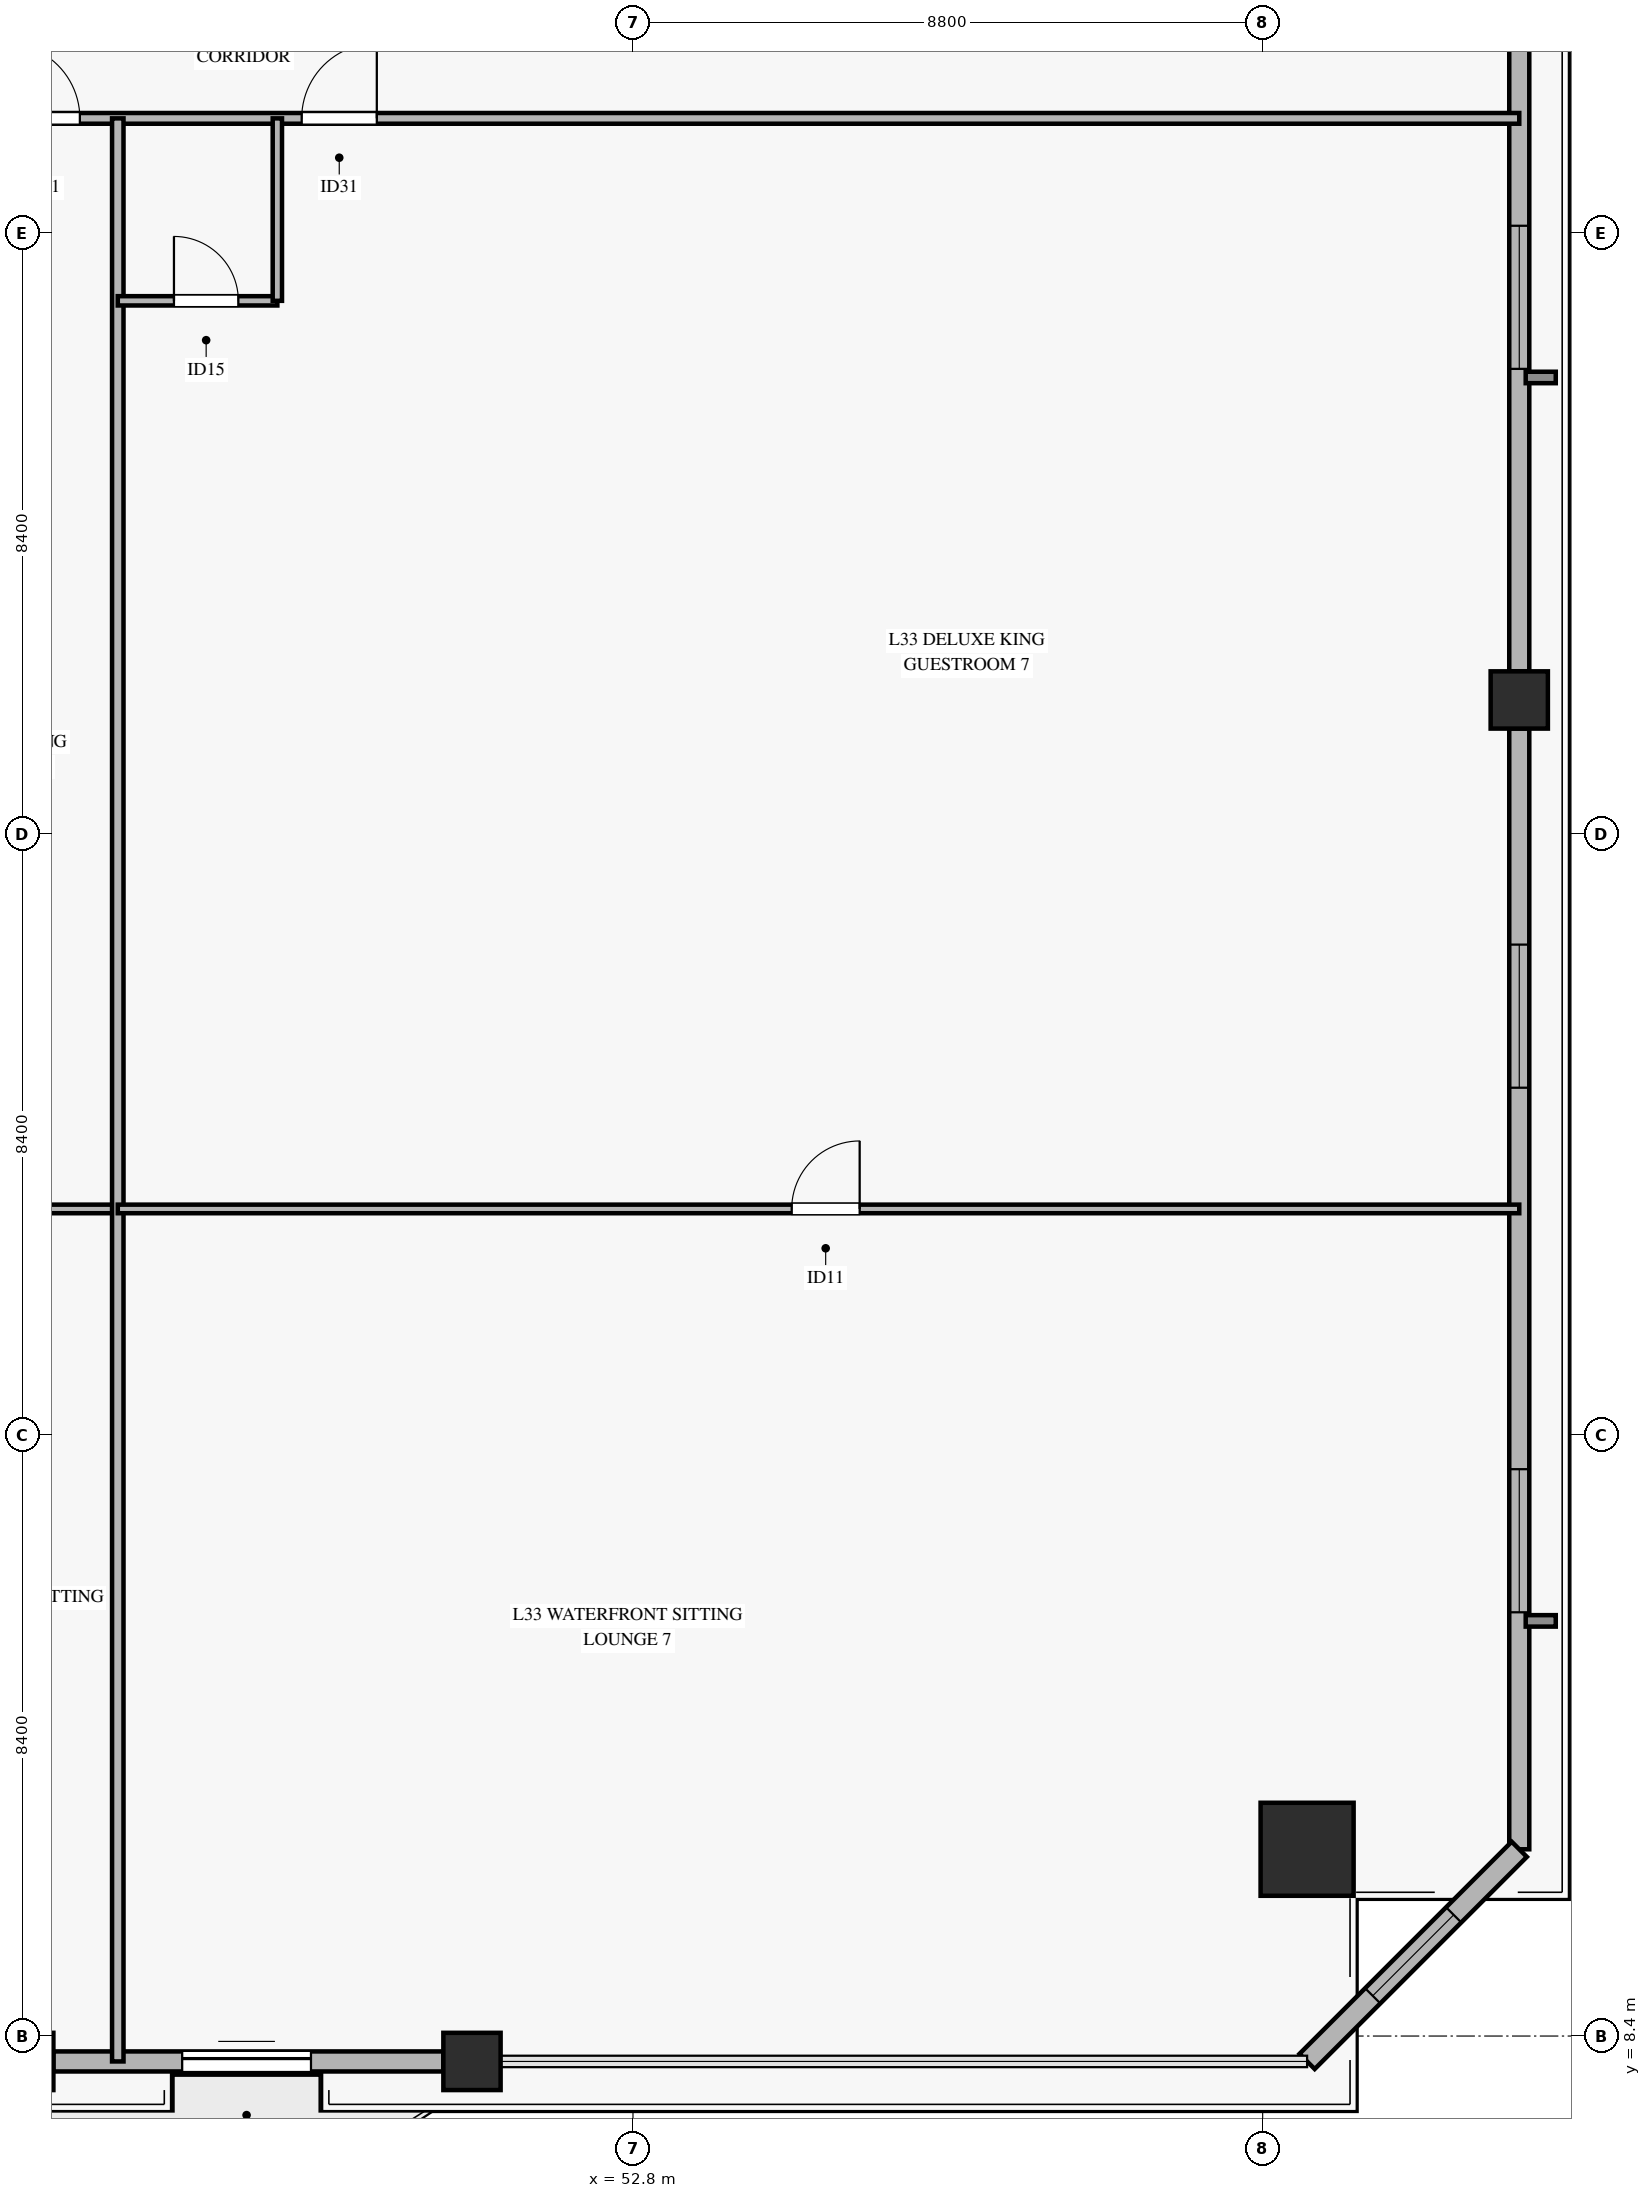
"""IFC4 building model, lengths in metres.
Left out: names, types, materials, properties, quantities, classifications, styles, units other than length and angle.
Written with IfcOpenShell. Run it as: python <this file> out.ifc"""

import sys

from ifc_helpers import new_model, si_unit, direction, frame, frame_2d, origin, origin_2d, place, context, subcontext, project, spatial, rectangle, hollow_rectangle, extrude, source, transform, mapped, element, fill, save


model = new_model("IFC4")
c1 = context("Model", 3, precision=1e-05, world=origin(), true_north=direction((0.0, 1.0)))
c2 = subcontext(c1, "Body", "Model", "MODEL_VIEW")
j1 = project(units=[si_unit("LENGTHUNIT", "METRE"), si_unit("PLANEANGLEUNIT", "RADIAN")], contexts=[c1])
p1 = place(None, origin())
s1 = spatial("IfcSite", under=j1, at=p1, CompositionType="ELEMENT")
p2 = place(p1, origin())
s2 = spatial("IfcBuilding", under=s1, at=p2, CompositionType="ELEMENT")
p3 = place(p2, frame((0.0, 0.0, 137.7)))
s3 = spatial("IfcBuildingStorey", under=s2, at=p3, CompositionType="ELEMENT", Elevation=137.7)
m1 = source(origin(), c2, "Body", "SweptSolid", [
    extrude(hollow_rectangle(XDim=1.3, YDim=1.3, WallThickness=0.06, at=origin_2d()), origin(), (0.0, 0.0, 1.0), 3.27),
])
p4 = place(p3, frame((62.221, 11.01, 0.0), z_axis=(0.0, 0.0, 1.0), x_axis=(1.0, 0.0, 0.0)))
e1 = element("IfcColumn", 1, at=p4, inside=s3, PredefinedType="COLUMN", context=c2, shape_type="MappedRepresentation", body=[
    mapped(m1, transform((0.0, 0.0, 0.0), x_axis=(1.0, 0.0, 0.0), y_axis=(0.0, 1.0, 0.0), z_axis=(0.0, 0.0, 1.0), scale=1.0)),
])
m2 = source(origin(), c2, "Body", "SweptSolid", [
    extrude(hollow_rectangle(XDim=0.8, YDim=0.8, WallThickness=0.036, at=origin_2d()), origin(), (0.0, 0.0, 1.0), 3.27),
])
for number, where, z_axis, x_axis in (
    (2, (44.3, 8.045, 0.0), (0.0, 0.0, 1.0), (1.0, 0.0, 0.0)),
    (3, (50.55, 8.045, 0.0), (0.0, 0.0, 1.0), (1.0, 0.0, 0.0)),
    (4, (65.186, 27.072, 0.0), (0.0, 0.0, 1.0), (1.0, 0.0, 0.0)),
):
    element("IfcColumn", number, at=place(p3, frame(where, z_axis=z_axis, x_axis=x_axis)), inside=s3, PredefinedType="COLUMN", context=c2, shape_type="MappedRepresentation", body=[
        mapped(m2, transform((0.0, 0.0, 0.0), x_axis=(1.0, 0.0, 0.0), y_axis=(0.0, 1.0, 0.0), z_axis=(0.0, 0.0, 1.0), scale=1.0)),
    ])
p5 = place(p3, frame((44.7, 8.045, 0.0), z_axis=(0.0, 0.0, 1.0), x_axis=(1.0, 0.0, 0.0)))
e5 = element("IfcWall", 5, at=p5, inside=s3, PredefinedType="SOLIDWALL", context=c2, shape_type="SweptSolid", body=[
    extrude(rectangle(XDim=5.45, YDim=0.28, at=frame_2d((2.725, 0.0))), origin(), (0.0, 0.0, 1.0), 2.75),
])
p6 = place(p5, frame((1.8, 0.0, 0.0)))
e6 = element("IfcOpeningElement", 6, at=p6, cuts=e5, PredefinedType="OPENING", context=c2, shape_type="SweptSolid", body=[
    extrude(rectangle(XDim=1.8, YDim=2.25, at=frame_2d((0.9, 1.125))), frame((0.0, 0.15, 0.0), z_axis=(0.0, -1.0, 0.0), x_axis=(1.0, 0.0, 0.0)), (0.0, 0.0, 1.0), 0.3),
])
p7 = place(p3, frame((65.186, 11.01, 0.0), z_axis=(0.0, 0.0, 1.0), x_axis=(0.0, 1.0, 0.0)))
e7 = element("IfcWall", 7, at=p7, inside=s3, PredefinedType="SOLIDWALL", context=c2, shape_type="SweptSolid", body=[
    extrude(rectangle(XDim=15.662, YDim=0.28, at=frame_2d((7.831, 0.0))), origin(), (0.0, 0.0, 1.0), 2.75),
])
p8 = place(p7, frame((3.312, 0.0, 0.45)))
e8 = element("IfcOpeningElement", 8, at=p8, cuts=e7, PredefinedType="OPENING", context=c2, shape_type="SweptSolid", body=[
    extrude(rectangle(XDim=2.0, YDim=2.0, at=frame_2d((1.0, 1.0))), frame((0.0, 0.15, 0.0), z_axis=(0.0, -1.0, 0.0), x_axis=(1.0, 0.0, 0.0)), (0.0, 0.0, 1.0), 0.3),
])
p9 = place(p7, frame((10.643, 0.0, 0.45)))
e9 = element("IfcOpeningElement", 9, at=p9, cuts=e7, PredefinedType="OPENING", context=c2, shape_type="SweptSolid", body=[
    extrude(rectangle(XDim=2.0, YDim=2.0, at=frame_2d((1.0, 1.0))), frame((0.0, 0.15, 0.0), z_axis=(0.0, -1.0, 0.0), x_axis=(1.0, 0.0, 0.0)), (0.0, 0.0, 1.0), 0.3),
])
p10 = place(p3, frame((65.186, 27.472, 0.0), z_axis=(0.0, 0.0, 1.0), x_axis=(0.0, 1.0, 0.0)))
e10 = element("IfcWall", 10, at=p10, inside=s3, PredefinedType="SOLIDWALL", context=c2, shape_type="SweptSolid", body=[
    extrude(rectangle(XDim=15.662, YDim=0.28, at=frame_2d((7.831, 0.0))), origin(), (0.0, 0.0, 1.0), 2.75),
])
p11 = place(p10, frame((4.227, 0.0, 0.45)))
e11 = element("IfcOpeningElement", 11, at=p11, cuts=e10, PredefinedType="OPENING", context=c2, shape_type="SweptSolid", body=[
    extrude(rectangle(XDim=2.0, YDim=2.0, at=frame_2d((1.0, 1.0))), frame((0.0, 0.15, 0.0), z_axis=(0.0, -1.0, 0.0), x_axis=(1.0, 0.0, 0.0)), (0.0, 0.0, 1.0), 0.3),
])
p12 = place(p3, frame((62.221, 8.045, 0.0), z_axis=(0.0, 0.0, 1.0), x_axis=(0.707106781187, 0.707106781187, 0.0)))
e12 = element("IfcWall", 12, at=p12, inside=s3, PredefinedType="SOLIDWALL", context=c2, shape_type="SweptSolid", body=[
    extrude(rectangle(XDim=4.193, YDim=0.3, at=frame_2d((2.097, 0.0))), origin(), (0.0, 0.0, 1.0), 2.75),
])
p13 = place(p12, frame((1.297, 0.0, 0.45)))
e13 = element("IfcOpeningElement", 13, at=p13, cuts=e12, PredefinedType="OPENING", context=c2, shape_type="SweptSolid", body=[
    extrude(rectangle(XDim=1.6, YDim=2.0, at=frame_2d((0.8, 1.0))), frame((0.0, 0.16, 0.0), z_axis=(0.0, -1.0, 0.0), x_axis=(1.0, 0.0, 0.0)), (0.0, 0.0, 1.0), 0.32),
])
p14 = place(p3, frame((5.214, 35.2, 0.0), z_axis=(0.0, 0.0, 1.0), x_axis=(1.0, 0.0, 0.0)))
e14 = element("IfcWall", 14, at=p14, inside=s3, PredefinedType="PARTITIONING", context=c2, shape_type="SweptSolid", body=[
    extrude(rectangle(XDim=59.972, YDim=0.15, at=frame_2d((29.986, 0.0))), origin(), (0.0, 0.0, 1.0), 2.455),
])
p15 = place(p14, frame((2.77, 0.0, 0.0)))
e15 = element("IfcOpeningElement", 15, at=p15, cuts=e14, PredefinedType="OPENING", context=c2, shape_type="SweptSolid", body=[
    extrude(rectangle(XDim=1.05, YDim=2.15, at=frame_2d((0.525, 1.075))), frame((0.0, 0.085, 0.0), z_axis=(0.0, -1.0, 0.0), x_axis=(1.0, 0.0, 0.0)), (0.0, 0.0, 1.0), 0.17),
])
p16 = place(p14, frame((19.156, 0.0, 0.0)))
e16 = element("IfcOpeningElement", 16, at=p16, cuts=e14, PredefinedType="OPENING", context=c2, shape_type="SweptSolid", body=[
    extrude(rectangle(XDim=1.05, YDim=2.15, at=frame_2d((0.525, 1.075))), frame((0.0, 0.085, 0.0), z_axis=(0.0, -1.0, 0.0), x_axis=(1.0, 0.0, 0.0)), (0.0, 0.0, 1.0), 0.17),
])
p17 = place(p14, frame((24.662, 0.0, 0.0)))
e17 = element("IfcOpeningElement", 17, at=p17, cuts=e14, PredefinedType="OPENING", context=c2, shape_type="SweptSolid", body=[
    extrude(rectangle(XDim=1.05, YDim=2.15, at=frame_2d((0.525, 1.075))), frame((0.0, 0.085, 0.0), z_axis=(0.0, -1.0, 0.0), x_axis=(1.0, 0.0, 0.0)), (0.0, 0.0, 1.0), 0.17),
])
p18 = place(p14, frame((29.462, 0.0, 0.0)))
e18 = element("IfcOpeningElement", 18, at=p18, cuts=e14, PredefinedType="OPENING", context=c2, shape_type="SweptSolid", body=[
    extrude(rectangle(XDim=1.05, YDim=2.15, at=frame_2d((0.525, 1.075))), frame((0.0, 0.085, 0.0), z_axis=(0.0, -1.0, 0.0), x_axis=(1.0, 0.0, 0.0)), (0.0, 0.0, 1.0), 0.17),
])
p19 = place(p14, frame((34.262, 0.0, 0.0)))
e19 = element("IfcOpeningElement", 19, at=p19, cuts=e14, PredefinedType="OPENING", context=c2, shape_type="SweptSolid", body=[
    extrude(rectangle(XDim=1.05, YDim=2.15, at=frame_2d((0.525, 1.075))), frame((0.0, 0.085, 0.0), z_axis=(0.0, -1.0, 0.0), x_axis=(1.0, 0.0, 0.0)), (0.0, 0.0, 1.0), 0.17),
])
p20 = place(p14, frame((38.806, 0.0, 0.0)))
e20 = element("IfcOpeningElement", 20, at=p20, cuts=e14, PredefinedType="OPENING", context=c2, shape_type="SweptSolid", body=[
    extrude(rectangle(XDim=1.05, YDim=2.15, at=frame_2d((0.525, 1.075))), frame((0.0, 0.085, 0.0), z_axis=(0.0, -1.0, 0.0), x_axis=(1.0, 0.0, 0.0)), (0.0, 0.0, 1.0), 0.17),
])
p21 = place(p14, frame((42.956, 0.0, 0.0)))
e21 = element("IfcOpeningElement", 21, at=p21, cuts=e14, PredefinedType="OPENING", context=c2, shape_type="SweptSolid", body=[
    extrude(rectangle(XDim=1.05, YDim=2.15, at=frame_2d((0.525, 1.075))), frame((0.0, 0.085, 0.0), z_axis=(0.0, -1.0, 0.0), x_axis=(1.0, 0.0, 0.0)), (0.0, 0.0, 1.0), 0.17),
])
p22 = place(p3, frame((42.0, 19.959, 0.0), z_axis=(0.0, 0.0, 1.0), x_axis=(1.0, 0.0, 0.0)))
e22 = element("IfcWall", 22, at=p22, inside=s3, PredefinedType="PARTITIONING", context=c2, shape_type="SweptSolid", body=[
    extrude(rectangle(XDim=3.6, YDim=0.12, at=frame_2d((1.8, 0.0))), origin(), (0.0, 0.0, 1.0), 2.455),
])
p23 = place(p22, frame((1.525, 0.0, 0.0)))
e23 = element("IfcOpeningElement", 23, at=p23, cuts=e22, PredefinedType="OPENING", context=c2, shape_type="SweptSolid", body=[
    extrude(rectangle(XDim=0.95, YDim=2.1, at=frame_2d((0.475, 1.05))), frame((0.0, 0.07, 0.0), z_axis=(0.0, -1.0, 0.0), x_axis=(1.0, 0.0, 0.0)), (0.0, 0.0, 1.0), 0.14),
])
p24 = place(p3, frame((45.6, 8.045, 0.0), z_axis=(0.0, 0.0, 1.0), x_axis=(0.0, 1.0, 0.0)))
e24 = element("IfcWall", 24, at=p24, inside=s3, PredefinedType="PARTITIONING", context=c2, shape_type="SweptSolid", body=[
    extrude(rectangle(XDim=27.155, YDim=0.16, at=frame_2d((13.578, 0.0))), origin(), (0.0, 0.0, 1.0), 2.755),
])
p25 = place(p3, frame((45.6, 32.65, 0.0), z_axis=(0.0, 0.0, 1.0), x_axis=(1.0, 0.0, 0.0)))
e25 = element("IfcWall", 25, at=p25, inside=s3, PredefinedType="PARTITIONING", context=c2, shape_type="SweptSolid", body=[
    extrude(rectangle(XDim=2.23, YDim=0.13, at=frame_2d((1.115, 0.0))), origin(), (0.0, 0.0, 1.0), 2.805),
])
p26 = place(p25, frame((0.785, 0.0, 0.0)))
e26 = element("IfcOpeningElement", 26, at=p26, cuts=e25, PredefinedType="OPENING", context=c2, shape_type="SweptSolid", body=[
    extrude(rectangle(XDim=0.9, YDim=2.1, at=frame_2d((0.45, 1.05))), frame((0.0, 0.075, 0.0), z_axis=(0.0, -1.0, 0.0), x_axis=(1.0, 0.0, 0.0)), (0.0, 0.0, 1.0), 0.15),
])
p27 = place(p3, frame((47.83, 32.65, 0.0), z_axis=(0.0, 0.0, 1.0), x_axis=(0.0, 1.0, 0.0)))
e27 = element("IfcWall", 27, at=p27, inside=s3, PredefinedType="PARTITIONING", context=c2, shape_type="SweptSolid", body=[
    extrude(rectangle(XDim=2.55, YDim=0.13, at=frame_2d((1.275, 0.0))), origin(), (0.0, 0.0, 1.0), 3.27),
])
p28 = place(p3, frame((45.6, 19.959, 0.0), z_axis=(0.0, 0.0, 1.0), x_axis=(1.0, 0.0, 0.0)))
e28 = element("IfcWall", 28, at=p28, inside=s3, PredefinedType="PARTITIONING", context=c2, shape_type="SweptSolid", body=[
    extrude(rectangle(XDim=19.586, YDim=0.12, at=frame_2d((9.793, 0.0))), origin(), (0.0, 0.0, 1.0), 2.455),
])
p29 = place(p28, frame((9.418, 0.0, 0.0)))
e29 = element("IfcOpeningElement", 29, at=p29, cuts=e28, PredefinedType="OPENING", context=c2, shape_type="SweptSolid", body=[
    extrude(rectangle(XDim=0.95, YDim=2.1, at=frame_2d((0.475, 1.05))), frame((0.0, 0.07, 0.0), z_axis=(0.0, -1.0, 0.0), x_axis=(1.0, 0.0, 0.0)), (0.0, 0.0, 1.0), 0.14),
])
m3 = source(origin(), c2, "Body", "SweptSolid", [
    extrude(rectangle(XDim=1.8, YDim=2.25, at=frame_2d((0.9, 1.125))), frame((0.0, 0.025, 0.0), z_axis=(0.0, -1.0, 0.0), x_axis=(1.0, 0.0, 0.0)), (0.0, 0.0, 1.0), 0.05),
])
p30 = place(p6, origin())
e30 = element("IfcDoor", 30, at=p30, inside=s3, OperationType="SLIDING_TO_LEFT", PredefinedType="DOOR", context=c2, shape_type="MappedRepresentation", body=[
    mapped(m3, transform((0.0, 0.0, 0.0), x_axis=(1.0, 0.0, 0.0), y_axis=(0.0, 1.0, 0.0), z_axis=(0.0, 0.0, 1.0), scale=1.0)),
])
fill(e6, e30)
m4 = source(origin(), c2, "Body", "SweptSolid", [
    extrude(rectangle(XDim=2.0, YDim=2.0, at=frame_2d((1.0, 1.0))), frame((0.0, 0.03, 0.0), z_axis=(0.0, -1.0, 0.0), x_axis=(1.0, 0.0, 0.0)), (0.0, 0.0, 1.0), 0.06),
])
p31 = place(p8, origin())
e31 = element("IfcWindow", 31, at=p31, inside=s3, PartitioningType="SINGLE_PANEL", PredefinedType="WINDOW", context=c2, shape_type="MappedRepresentation", body=[
    mapped(m4, transform((0.0, 0.0, 0.0), x_axis=(1.0, 0.0, 0.0), y_axis=(0.0, 1.0, 0.0), z_axis=(0.0, 0.0, 1.0), scale=1.0)),
])
fill(e8, e31)
p32 = place(p9, origin())
e32 = element("IfcWindow", 32, at=p32, inside=s3, PartitioningType="SINGLE_PANEL", PredefinedType="WINDOW", context=c2, shape_type="MappedRepresentation", body=[
    mapped(m4, transform((0.0, 0.0, 0.0), x_axis=(1.0, 0.0, 0.0), y_axis=(0.0, 1.0, 0.0), z_axis=(0.0, 0.0, 1.0), scale=1.0)),
])
fill(e9, e32)
p33 = place(p11, origin())
e33 = element("IfcWindow", 33, at=p33, inside=s3, PartitioningType="SINGLE_PANEL", PredefinedType="WINDOW", context=c2, shape_type="MappedRepresentation", body=[
    mapped(m4, transform((0.0, 0.0, 0.0), x_axis=(1.0, 0.0, 0.0), y_axis=(0.0, 1.0, 0.0), z_axis=(0.0, 0.0, 1.0), scale=1.0)),
])
fill(e11, e33)
m5 = source(origin(), c2, "Body", "SweptSolid", [
    extrude(rectangle(XDim=1.6, YDim=2.0, at=frame_2d((0.8, 1.0))), frame((0.0, 0.03, 0.0), z_axis=(0.0, -1.0, 0.0), x_axis=(1.0, 0.0, 0.0)), (0.0, 0.0, 1.0), 0.06),
])
p34 = place(p13, origin())
e34 = element("IfcWindow", 34, at=p34, inside=s3, PartitioningType="SINGLE_PANEL", PredefinedType="WINDOW", context=c2, shape_type="MappedRepresentation", body=[
    mapped(m5, transform((0.0, 0.0, 0.0), x_axis=(1.0, 0.0, 0.0), y_axis=(0.0, 1.0, 0.0), z_axis=(0.0, 0.0, 1.0), scale=1.0)),
])
fill(e13, e34)
m6 = source(origin(), c2, "Body", "SweptSolid", [
    extrude(rectangle(XDim=1.05, YDim=2.15, at=frame_2d((0.525, 1.075))), frame((0.0, 0.025, 0.0), z_axis=(0.0, -1.0, 0.0), x_axis=(1.0, 0.0, 0.0)), (0.0, 0.0, 1.0), 0.05),
])
p35 = place(p20, origin())
e35 = element("IfcDoor", 35, at=p35, inside=s3, OperationType="SINGLE_SWING_LEFT", PredefinedType="DOOR", context=c2, shape_type="MappedRepresentation", body=[
    mapped(m6, transform((0.0, 0.0, 0.0), x_axis=(1.0, 0.0, 0.0), y_axis=(0.0, 1.0, 0.0), z_axis=(0.0, 0.0, 1.0), scale=1.0)),
])
fill(e20, e35)
p36 = place(p21, origin())
e36 = element("IfcDoor", 36, at=p36, inside=s3, OperationType="SINGLE_SWING_RIGHT", PredefinedType="DOOR", context=c2, shape_type="MappedRepresentation", body=[
    mapped(m6, transform((0.0, 0.0, 0.0), x_axis=(1.0, 0.0, 0.0), y_axis=(0.0, 1.0, 0.0), z_axis=(0.0, 0.0, 1.0), scale=1.0)),
])
fill(e21, e36)
m7 = source(origin(), c2, "Body", "SweptSolid", [
    extrude(rectangle(XDim=0.9, YDim=2.1, at=frame_2d((0.45, 1.05))), frame((0.0, 0.025, 0.0), z_axis=(0.0, -1.0, 0.0), x_axis=(1.0, 0.0, 0.0)), (0.0, 0.0, 1.0), 0.05),
])
p37 = place(p26, origin())
e37 = element("IfcDoor", 37, at=p37, inside=s3, OperationType="SINGLE_SWING_LEFT", PredefinedType="DOOR", context=c2, shape_type="MappedRepresentation", body=[
    mapped(m7, transform((0.0, 0.0, 0.0), x_axis=(1.0, 0.0, 0.0), y_axis=(0.0, 1.0, 0.0), z_axis=(0.0, 0.0, 1.0), scale=1.0)),
])
fill(e26, e37)
m8 = source(origin(), c2, "Body", "SweptSolid", [
    extrude(rectangle(XDim=0.95, YDim=2.1, at=frame_2d((0.475, 1.05))), frame((0.0, 0.025, 0.0), z_axis=(0.0, -1.0, 0.0), x_axis=(1.0, 0.0, 0.0)), (0.0, 0.0, 1.0), 0.05),
])
p38 = place(p29, origin())
e38 = element("IfcDoor", 38, at=p38, inside=s3, OperationType="SINGLE_SWING_RIGHT", PredefinedType="DOOR", context=c2, shape_type="MappedRepresentation", body=[
    mapped(m8, transform((0.0, 0.0, 0.0), x_axis=(1.0, 0.0, 0.0), y_axis=(0.0, 1.0, 0.0), z_axis=(0.0, 0.0, 1.0), scale=1.0)),
])
fill(e29, e38)
save(model, sys.argv[1])
